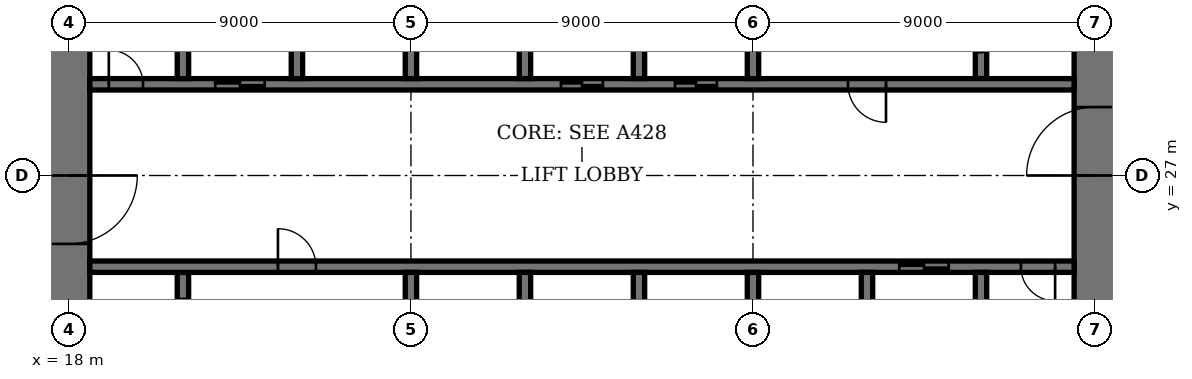
"""IFC4 building model, lengths in metres.
Left out: names, types, materials, properties, quantities, classifications, styles, units other than length and angle.
Written with IfcOpenShell. Run it as: python <this file> out.ifc"""

import sys

from ifc_helpers import new_model, si_unit, direction, frame, frame_2d, origin, place, context, subcontext, project, spatial, rectangle, extrude, element, fill, save


model = new_model("IFC4")
c1 = context("Model", 3, precision=1e-05, world=origin(), true_north=direction((0.0, 1.0)))
c2 = subcontext(c1, "Body", "Model", "MODEL_VIEW")
j1 = project(units=[si_unit("LENGTHUNIT", "METRE"), si_unit("PLANEANGLEUNIT", "RADIAN")], contexts=[c1])
p1 = place(None, origin())
s1 = spatial("IfcSite", under=j1, at=p1, CompositionType="ELEMENT")
p2 = place(p1, origin())
s2 = spatial("IfcBuilding", under=s1, at=p2, CompositionType="ELEMENT")
p3 = place(p2, frame((0.0, 0.0, 133.0)))
s3 = spatial("IfcBuildingStorey", under=s2, at=p3, CompositionType="ELEMENT", Elevation=133.0)
p4 = place(p3, frame((18.0, 35.45, 0.0), z_axis=(0.0, 0.0, 1.0), x_axis=(0.0, -1.0, 0.0)))
e1 = element("IfcWall", 1, at=p4, inside=s3, PredefinedType="SHEAR", context=c2, shape_type="SweptSolid", body=[
    extrude(rectangle(XDim=16.9, YDim=1.1, at=frame_2d((8.45, 0.0))), origin(), (0.0, 0.0, 1.0), 4.0),
])
p5 = place(p4, frame((8.45, 0.0, 0.0)))
e2 = element("IfcOpeningElement", 2, at=p5, cuts=e1, PredefinedType="OPENING", context=c2, shape_type="SweptSolid", body=[
    extrude(rectangle(XDim=1.8, YDim=2.4, at=frame_2d((0.9, 1.2))), frame((0.0, 0.56, 0.0), z_axis=(0.0, -1.0, 0.0), x_axis=(1.0, 0.0, 0.0)), (0.0, 0.0, 1.0), 1.12),
])
p6 = place(p3, frame((45.0, 18.55, 0.0), z_axis=(0.0, 0.0, 1.0), x_axis=(0.0, 1.0, 0.0)))
e3 = element("IfcWall", 3, at=p6, inside=s3, PredefinedType="SHEAR", context=c2, shape_type="SweptSolid", body=[
    extrude(rectangle(XDim=16.9, YDim=1.1, at=frame_2d((8.45, 0.0))), origin(), (0.0, 0.0, 1.0), 4.0),
])
p7 = place(p6, frame((8.45, 0.0, 0.0)))
e4 = element("IfcOpeningElement", 4, at=p7, cuts=e3, PredefinedType="OPENING", context=c2, shape_type="SweptSolid", body=[
    extrude(rectangle(XDim=1.8, YDim=2.4, at=frame_2d((0.9, 1.2))), frame((0.0, 0.56, 0.0), z_axis=(0.0, -1.0, 0.0), x_axis=(1.0, 0.0, 0.0)), (0.0, 0.0, 1.0), 1.12),
])
p8 = place(p3, frame((21.0, 21.95, 0.0), z_axis=(0.0, 0.0, 1.0), x_axis=(0.0, 1.0, 0.0)))
e5 = element("IfcWall", 5, at=p8, inside=s3, PredefinedType="SHEAR", context=c2, shape_type="SweptSolid", body=[
    extrude(rectangle(XDim=2.5, YDim=0.3, at=frame_2d((1.25, 0.0))), origin(), (0.0, 0.0, 1.0), 4.0),
])
p9 = place(p8, frame((0.7, 0.0, 0.0)))
e6 = element("IfcOpeningElement", 6, at=p9, cuts=e5, PredefinedType="OPENING", context=c2, shape_type="SweptSolid", body=[
    extrude(rectangle(XDim=1.1, YDim=2.4, at=frame_2d((0.55, 1.2))), frame((0.0, 0.16, 0.0), z_axis=(0.0, -1.0, 0.0), x_axis=(1.0, 0.0, 0.0)), (0.0, 0.0, 1.0), 0.32),
])
p10 = place(p3, frame((42.0, 29.55, 0.0), z_axis=(0.0, 0.0, 1.0), x_axis=(0.0, 1.0, 0.0)))
e7 = element("IfcWall", 7, at=p10, inside=s3, PredefinedType="SHEAR", context=c2, shape_type="SweptSolid", body=[
    extrude(rectangle(XDim=2.5, YDim=0.3, at=frame_2d((1.25, 0.0))), origin(), (0.0, 0.0, 1.0), 4.0),
])
p11 = place(p10, frame((0.7, 0.0, 0.0)))
e8 = element("IfcOpeningElement", 8, at=p11, cuts=e7, PredefinedType="OPENING", context=c2, shape_type="SweptSolid", body=[
    extrude(rectangle(XDim=1.1, YDim=2.4, at=frame_2d((0.55, 1.2))), frame((0.0, 0.16, 0.0), z_axis=(0.0, -1.0, 0.0), x_axis=(1.0, 0.0, 0.0)), (0.0, 0.0, 1.0), 0.32),
])
p12 = place(p3, frame((18.55, 24.6, 0.0), z_axis=(0.0, 0.0, 1.0), x_axis=(1.0, 0.0, 0.0)))
e9 = element("IfcWall", 9, at=p12, inside=s3, PredefinedType="SHEAR", context=c2, shape_type="SweptSolid", body=[
    extrude(rectangle(XDim=25.9, YDim=0.3, at=frame_2d((12.95, 0.0))), origin(), (0.0, 0.0, 1.0), 4.0),
])
p13 = place(p12, frame((4.95, 0.0, 0.0)))
e10 = element("IfcOpeningElement", 10, at=p13, cuts=e9, PredefinedType="OPENING", context=c2, shape_type="SweptSolid", body=[
    extrude(rectangle(XDim=1.0, YDim=2.4, at=frame_2d((0.5, 1.2))), frame((0.0, 0.16, 0.0), z_axis=(0.0, -1.0, 0.0), x_axis=(1.0, 0.0, 0.0)), (0.0, 0.0, 1.0), 0.32),
])
p14 = place(p12, frame((24.5, 0.0, 0.0)))
e11 = element("IfcOpeningElement", 11, at=p14, cuts=e9, PredefinedType="OPENING", context=c2, shape_type="SweptSolid", body=[
    extrude(rectangle(XDim=0.9, YDim=2.1, at=frame_2d((0.45, 1.05))), frame((0.0, 0.16, 0.0), z_axis=(0.0, -1.0, 0.0), x_axis=(1.0, 0.0, 0.0)), (0.0, 0.0, 1.0), 0.32),
])
p15 = place(p12, frame((21.3, 0.0, 0.0)))
e12 = element("IfcOpeningElement", 12, at=p15, cuts=e9, PredefinedType="OPENING", context=c2, shape_type="SweptSolid", body=[
    extrude(rectangle(XDim=1.3, YDim=2.4, at=frame_2d((0.65, 1.2))), frame((0.0, 0.16, 0.0), z_axis=(0.0, -1.0, 0.0), x_axis=(1.0, 0.0, 0.0)), (0.0, 0.0, 1.0), 0.32),
])
p16 = place(p3, frame((18.55, 29.4, 0.0), z_axis=(0.0, 0.0, 1.0), x_axis=(1.0, 0.0, 0.0)))
e13 = element("IfcWall", 13, at=p16, inside=s3, PredefinedType="SHEAR", context=c2, shape_type="SweptSolid", body=[
    extrude(rectangle(XDim=25.9, YDim=0.3, at=frame_2d((12.95, 0.0))), origin(), (0.0, 0.0, 1.0), 4.0),
])
p17 = place(p16, frame((19.95, 0.0, 0.0)))
e14 = element("IfcOpeningElement", 14, at=p17, cuts=e13, PredefinedType="OPENING", context=c2, shape_type="SweptSolid", body=[
    extrude(rectangle(XDim=1.0, YDim=2.4, at=frame_2d((0.5, 1.2))), frame((0.0, 0.16, 0.0), z_axis=(0.0, -1.0, 0.0), x_axis=(1.0, 0.0, 0.0)), (0.0, 0.0, 1.0), 0.32),
])
p18 = place(p16, frame((0.5, 0.0, 0.0)))
e15 = element("IfcOpeningElement", 15, at=p18, cuts=e13, PredefinedType="OPENING", context=c2, shape_type="SweptSolid", body=[
    extrude(rectangle(XDim=0.9, YDim=2.1, at=frame_2d((0.45, 1.05))), frame((0.0, 0.16, 0.0), z_axis=(0.0, -1.0, 0.0), x_axis=(1.0, 0.0, 0.0)), (0.0, 0.0, 1.0), 0.32),
])
p19 = place(p16, frame((15.4, 0.0, 0.0)))
e16 = element("IfcOpeningElement", 16, at=p19, cuts=e13, PredefinedType="OPENING", context=c2, shape_type="SweptSolid", body=[
    extrude(rectangle(XDim=1.1, YDim=2.4, at=frame_2d((0.55, 1.2))), frame((0.0, 0.16, 0.0), z_axis=(0.0, -1.0, 0.0), x_axis=(1.0, 0.0, 0.0)), (0.0, 0.0, 1.0), 0.32),
])
p20 = place(p16, frame((12.4, 0.0, 0.0)))
e17 = element("IfcOpeningElement", 17, at=p20, cuts=e13, PredefinedType="OPENING", context=c2, shape_type="SweptSolid", body=[
    extrude(rectangle(XDim=1.1, YDim=2.4, at=frame_2d((0.55, 1.2))), frame((0.0, 0.16, 0.0), z_axis=(0.0, -1.0, 0.0), x_axis=(1.0, 0.0, 0.0)), (0.0, 0.0, 1.0), 0.32),
])
p21 = place(p16, frame((3.3, 0.0, 0.0)))
e18 = element("IfcOpeningElement", 18, at=p21, cuts=e13, PredefinedType="OPENING", context=c2, shape_type="SweptSolid", body=[
    extrude(rectangle(XDim=1.3, YDim=2.4, at=frame_2d((0.65, 1.2))), frame((0.0, 0.16, 0.0), z_axis=(0.0, -1.0, 0.0), x_axis=(1.0, 0.0, 0.0)), (0.0, 0.0, 1.0), 0.32),
])
for number, where, z_axis, x_axis in (
    (19, (30.0, 21.75, 0.0), (0.0, 0.0, 1.0), (0.0, 1.0, 0.0)),
    (20, (33.0, 29.55, 0.0), (0.0, 0.0, 1.0), (0.0, 1.0, 0.0)),
    (21, (33.0, 21.75, 0.0), (0.0, 0.0, 1.0), (0.0, 1.0, 0.0)),
    (22, (30.0, 29.55, 0.0), (0.0, 0.0, 1.0), (0.0, 1.0, 0.0)),
    (23, (36.0, 21.75, 0.0), (0.0, 0.0, 1.0), (0.0, 1.0, 0.0)),
    (24, (27.0, 29.55, 0.0), (0.0, 0.0, 1.0), (0.0, 1.0, 0.0)),
):
    element("IfcWall", number, at=place(p3, frame(where, z_axis=z_axis, x_axis=x_axis)), inside=s3, PredefinedType="SHEAR", context=c2, shape_type="SweptSolid", body=[
        extrude(rectangle(XDim=2.7, YDim=0.3, at=frame_2d((1.35, 0.0))), origin(), (0.0, 0.0, 1.0), 4.0),
    ])
for number, where, z_axis, x_axis in (
    (25, (39.0, 18.55, 0.0), (0.0, 0.0, 1.0), (0.0, 1.0, 0.0)),
    (26, (24.0, 29.55, 0.0), (0.0, 0.0, 1.0), (0.0, 1.0, 0.0)),
):
    element("IfcWall", number, at=place(p3, frame(where, z_axis=z_axis, x_axis=x_axis)), inside=s3, PredefinedType="SHEAR", context=c2, shape_type="SweptSolid", body=[
        extrude(rectangle(XDim=5.9, YDim=0.3, at=frame_2d((2.95, 0.0))), origin(), (0.0, 0.0, 1.0), 4.0),
    ])
for number, where, z_axis, x_axis in (
    (27, (42.0, 21.75, 0.0), (0.0, 0.0, 1.0), (0.0, 1.0, 0.0)),
    (28, (21.0, 29.55, 0.0), (0.0, 0.0, 1.0), (0.0, 1.0, 0.0)),
):
    element("IfcWall", number, at=place(p3, frame(where, z_axis=z_axis, x_axis=x_axis)), inside=s3, PredefinedType="SHEAR", context=c2, shape_type="SweptSolid", body=[
        extrude(rectangle(XDim=2.7, YDim=0.3, at=frame_2d((1.35, 0.0))), origin(), (0.0, 0.0, 1.0), 4.0),
    ])
for number, where, z_axis, x_axis in (
    (29, (27.0, 21.6, 0.0), (0.0, 0.0, 1.0), (0.0, 1.0, 0.0)),
    (30, (36.0, 29.55, 0.0), (0.0, 0.0, 1.0), (0.0, 1.0, 0.0)),
):
    element("IfcWall", number, at=place(p3, frame(where, z_axis=z_axis, x_axis=x_axis)), inside=s3, PredefinedType="SHEAR", context=c2, shape_type="SweptSolid", body=[
        extrude(rectangle(XDim=2.85, YDim=0.3, at=frame_2d((1.425, 0.0))), origin(), (0.0, 0.0, 1.0), 4.0),
    ])
p22 = place(p5, origin())
e31 = element("IfcDoor", 31, at=p22, inside=s3, OperationType="DOUBLE_DOOR_DOUBLE_SWING", PredefinedType="DOOR", context=c2, shape_type="SweptSolid", body=[
    extrude(rectangle(XDim=1.8, YDim=2.4, at=frame_2d((0.9, 1.2))), frame((0.0, 0.03, 0.0), z_axis=(0.0, -1.0, 0.0), x_axis=(1.0, 0.0, 0.0)), (0.0, 0.0, 1.0), 0.06),
    extrude(rectangle(XDim=0.04, YDim=2.4, at=frame_2d((0.02, 1.2))), frame((0.0, 0.55, 0.0), z_axis=(0.0, -1.0, 0.0), x_axis=(1.0, 0.0, 0.0)), (0.0, 0.0, 1.0), 1.1),
    extrude(rectangle(XDim=0.04, YDim=2.4, at=frame_2d((1.78, 1.2))), frame((0.0, 0.55, 0.0), z_axis=(0.0, -1.0, 0.0), x_axis=(1.0, 0.0, 0.0)), (0.0, 0.0, 1.0), 1.1),
    extrude(rectangle(XDim=1.8, YDim=0.04, at=frame_2d((0.9, 2.38))), frame((0.0, 0.55, 0.0), z_axis=(0.0, -1.0, 0.0), x_axis=(1.0, 0.0, 0.0)), (0.0, 0.0, 1.0), 1.1),
])
fill(e2, e31)
p23 = place(p7, origin())
e32 = element("IfcDoor", 32, at=p23, inside=s3, OperationType="DOUBLE_DOOR_DOUBLE_SWING", PredefinedType="DOOR", context=c2, shape_type="SweptSolid", body=[
    extrude(rectangle(XDim=1.8, YDim=2.4, at=frame_2d((0.9, 1.2))), frame((0.0, 0.03, 0.0), z_axis=(0.0, -1.0, 0.0), x_axis=(1.0, 0.0, 0.0)), (0.0, 0.0, 1.0), 0.06),
    extrude(rectangle(XDim=0.04, YDim=2.4, at=frame_2d((0.02, 1.2))), frame((0.0, 0.55, 0.0), z_axis=(0.0, -1.0, 0.0), x_axis=(1.0, 0.0, 0.0)), (0.0, 0.0, 1.0), 1.1),
    extrude(rectangle(XDim=0.04, YDim=2.4, at=frame_2d((1.78, 1.2))), frame((0.0, 0.55, 0.0), z_axis=(0.0, -1.0, 0.0), x_axis=(1.0, 0.0, 0.0)), (0.0, 0.0, 1.0), 1.1),
    extrude(rectangle(XDim=1.8, YDim=0.04, at=frame_2d((0.9, 2.38))), frame((0.0, 0.55, 0.0), z_axis=(0.0, -1.0, 0.0), x_axis=(1.0, 0.0, 0.0)), (0.0, 0.0, 1.0), 1.1),
])
fill(e4, e32)
p24 = place(p13, origin())
e33 = element("IfcDoor", 33, at=p24, inside=s3, OperationType="SINGLE_SWING_RIGHT", PredefinedType="DOOR", context=c2, shape_type="SweptSolid", body=[
    extrude(rectangle(XDim=1.0, YDim=2.4, at=frame_2d((0.5, 1.2))), frame((0.0, 0.03, 0.0), z_axis=(0.0, -1.0, 0.0), x_axis=(1.0, 0.0, 0.0)), (0.0, 0.0, 1.0), 0.06),
])
fill(e10, e33)
p25 = place(p17, origin())
e34 = element("IfcDoor", 34, at=p25, inside=s3, OperationType="SINGLE_SWING_RIGHT", PredefinedType="DOOR", context=c2, shape_type="SweptSolid", body=[
    extrude(rectangle(XDim=1.0, YDim=2.4, at=frame_2d((0.5, 1.2))), frame((0.0, 0.03, 0.0), z_axis=(0.0, -1.0, 0.0), x_axis=(1.0, 0.0, 0.0)), (0.0, 0.0, 1.0), 0.06),
])
fill(e14, e34)
p26 = place(p14, origin())
e35 = element("IfcDoor", 35, at=p26, inside=s3, OperationType="SINGLE_SWING_RIGHT", PredefinedType="DOOR", context=c2, shape_type="SweptSolid", body=[
    extrude(rectangle(XDim=0.9, YDim=2.1, at=frame_2d((0.45, 1.05))), frame((0.0, 0.03, 0.0), z_axis=(0.0, -1.0, 0.0), x_axis=(1.0, 0.0, 0.0)), (0.0, 0.0, 1.0), 0.06),
])
fill(e11, e35)
p27 = place(p18, origin())
e36 = element("IfcDoor", 36, at=p27, inside=s3, OperationType="SINGLE_SWING_RIGHT", PredefinedType="DOOR", context=c2, shape_type="SweptSolid", body=[
    extrude(rectangle(XDim=0.9, YDim=2.1, at=frame_2d((0.45, 1.05))), frame((0.0, 0.03, 0.0), z_axis=(0.0, -1.0, 0.0), x_axis=(1.0, 0.0, 0.0)), (0.0, 0.0, 1.0), 0.06),
])
fill(e15, e36)
p28 = place(p19, origin())
e37 = element("IfcDoor", 37, at=p28, inside=s3, OperationType="DOUBLE_DOOR_SLIDING", PredefinedType="DOOR", context=c2, shape_type="SweptSolid", body=[
    extrude(rectangle(XDim=1.1, YDim=2.4, at=frame_2d((0.55, 1.2))), frame((0.0, 0.02, 0.0), z_axis=(0.0, -1.0, 0.0), x_axis=(1.0, 0.0, 0.0)), (0.0, 0.0, 1.0), 0.04),
])
fill(e16, e37)
p29 = place(p20, origin())
e38 = element("IfcDoor", 38, at=p29, inside=s3, OperationType="DOUBLE_DOOR_SLIDING", PredefinedType="DOOR", context=c2, shape_type="SweptSolid", body=[
    extrude(rectangle(XDim=1.1, YDim=2.4, at=frame_2d((0.55, 1.2))), frame((0.0, 0.02, 0.0), z_axis=(0.0, -1.0, 0.0), x_axis=(1.0, 0.0, 0.0)), (0.0, 0.0, 1.0), 0.04),
])
fill(e17, e38)
p30 = place(p15, origin())
e39 = element("IfcDoor", 39, at=p30, inside=s3, OperationType="DOUBLE_DOOR_SLIDING", PredefinedType="DOOR", context=c2, shape_type="SweptSolid", body=[
    extrude(rectangle(XDim=1.3, YDim=2.4, at=frame_2d((0.65, 1.2))), frame((0.0, 0.02, 0.0), z_axis=(0.0, -1.0, 0.0), x_axis=(1.0, 0.0, 0.0)), (0.0, 0.0, 1.0), 0.04),
])
fill(e12, e39)
p31 = place(p21, origin())
e40 = element("IfcDoor", 40, at=p31, inside=s3, OperationType="DOUBLE_DOOR_SLIDING", PredefinedType="DOOR", context=c2, shape_type="SweptSolid", body=[
    extrude(rectangle(XDim=1.3, YDim=2.4, at=frame_2d((0.65, 1.2))), frame((0.0, 0.02, 0.0), z_axis=(0.0, -1.0, 0.0), x_axis=(1.0, 0.0, 0.0)), (0.0, 0.0, 1.0), 0.04),
])
fill(e18, e40)
save(model, sys.argv[1])
